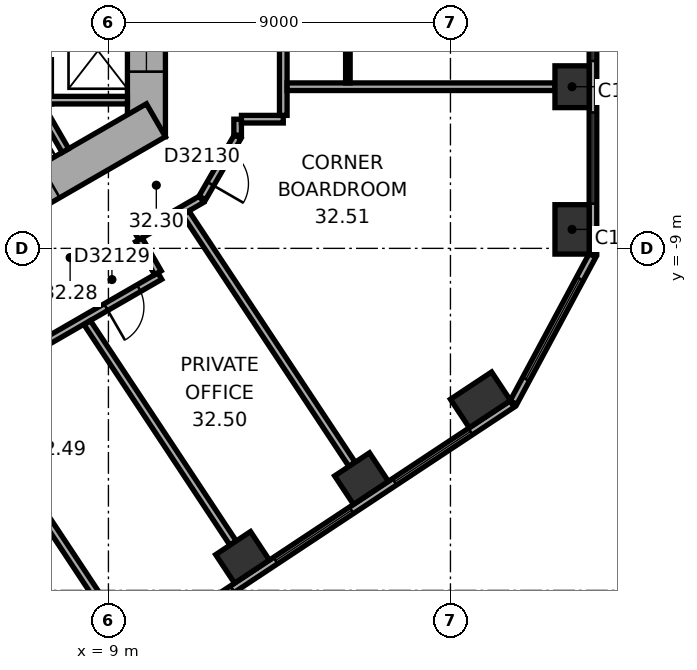
"""IFC4 building model, lengths in metres.
Left out: names, types, materials, properties, quantities, classifications, styles, units other than length and angle.
Written with IfcOpenShell. Run it as: python <this file> out.ifc"""

import sys

from ifc_helpers import new_model, si_unit, direction, frame, frame_2d, origin, origin_2d, place, context, subcontext, project, spatial, rectangle, extrude, element, fill, save


model = new_model("IFC4")
c1 = context("Model", 3, precision=1e-05, world=origin(), true_north=direction((0.0, 1.0)))
c2 = subcontext(c1, "Body", "Model", "MODEL_VIEW")
j1 = project(units=[si_unit("LENGTHUNIT", "METRE"), si_unit("PLANEANGLEUNIT", "RADIAN")], contexts=[c1])
p1 = place(None, origin())
s1 = spatial("IfcSite", under=j1, at=p1, CompositionType="ELEMENT")
p2 = place(p1, origin())
s2 = spatial("IfcBuilding", under=s1, at=p2, CompositionType="ELEMENT")
p3 = place(p2, frame((0.0, 0.0, 131.8)))
s3 = spatial("IfcBuildingStorey", under=s2, at=p3, CompositionType="ELEMENT", Elevation=131.8)
p4 = place(p3, frame((21.2, -8.501, 0.0), z_axis=(0.0, 0.0, 1.0), x_axis=(0.0, 1.0, 0.0)))
e1 = element("IfcColumn", 1, at=p4, inside=s3, PredefinedType="COLUMN", context=c2, shape_type="SweptSolid", body=[
    extrude(rectangle(XDim=1.3, YDim=0.9, at=origin_2d()), origin(), (0.0, 0.0, 1.0), 3.7),
])
for number, where, z_axis, x_axis in (
    (2, (21.2, -4.747, 0.0), (0.0, 0.0, 1.0), (0.0, 1.0, 0.0)),
    (3, (12.529, -17.13, 0.0), (0.0, 0.0, 1.0), (0.834, 0.552, 0.0)),
    (4, (15.659, -15.058, 0.0), (0.0, 0.0, 1.0), (0.834, 0.552, 0.0)),
):
    element("IfcColumn", number, at=place(p3, frame(where, z_axis=z_axis, x_axis=x_axis)), inside=s3, PredefinedType="COLUMN", context=c2, shape_type="SweptSolid", body=[
        extrude(rectangle(XDim=1.1, YDim=0.9, at=origin_2d()), origin(), (0.0, 0.0, 1.0), 3.7),
    ])
p5 = place(p3, frame((18.79, -12.986, 0.0), z_axis=(0.0, 0.0, 1.0), x_axis=(0.833885822067, 0.551936985312, 0.0)))
e5 = element("IfcColumn", 5, at=p5, inside=s3, PredefinedType="COLUMN", context=c2, shape_type="SweptSolid", body=[
    extrude(rectangle(XDim=1.3, YDim=0.9, at=origin_2d()), origin(), (0.0, 0.0, 1.0), 3.7),
])
p6 = place(p3, frame((10.0, -6.062, 0.0), z_axis=(0.0, 0.0, 1.0), x_axis=(0.0, 1.0, 0.0)))
e6 = element("IfcWall", 6, at=p6, inside=s3, PredefinedType="SHEAR", context=c2, shape_type="SweptSolid", body=[
    extrude(rectangle(XDim=12.125, YDim=1.0, at=frame_2d((6.062, 0.0))), origin(), (0.0, 0.0, 1.0), 3.7),
])
p7 = place(p6, frame((6.262, 0.0, 0.0)))
e7 = element("IfcOpeningElement", 7, at=p7, cuts=e6, PredefinedType="OPENING", context=c2, shape_type="SweptSolid", body=[
    extrude(rectangle(XDim=1.5, YDim=2.1, at=frame_2d((0.75, 1.05))), frame((0.0, 0.51, 0.0), z_axis=(0.0, -1.0, 0.0), x_axis=(1.0, 0.0, 0.0)), (0.0, 0.0, 1.0), 1.02),
])
p8 = place(p6, frame((1.712, 0.0, 0.0)))
e8 = element("IfcOpeningElement", 8, at=p8, cuts=e6, PredefinedType="OPENING", context=c2, shape_type="SweptSolid", body=[
    extrude(rectangle(XDim=1.1, YDim=2.1, at=frame_2d((0.55, 1.05))), frame((0.0, 0.51, 0.0), z_axis=(0.0, -1.0, 0.0), x_axis=(1.0, 0.0, 0.0)), (0.0, 0.0, 1.0), 1.02),
])
p9 = place(p6, frame((4.312, 0.0, 0.0)))
e9 = element("IfcOpeningElement", 9, at=p9, cuts=e6, PredefinedType="OPENING", context=c2, shape_type="SweptSolid", body=[
    extrude(rectangle(XDim=1.1, YDim=2.1, at=frame_2d((0.55, 1.05))), frame((0.0, 0.51, 0.0), z_axis=(0.0, -1.0, 0.0), x_axis=(1.0, 0.0, 0.0)), (0.0, 0.0, 1.0), 1.02),
])
p10 = place(p3, frame((-0.25, -11.691, 0.0), z_axis=(0.0, 0.0, 1.0), x_axis=(0.866022616891, 0.50000482701, 0.0)))
e10 = element("IfcWall", 10, at=p10, inside=s3, PredefinedType="SHEAR", context=c2, shape_type="SweptSolid", body=[
    extrude(rectangle(XDim=12.125, YDim=1.0, at=frame_2d((6.062, 0.0))), origin(), (0.0, 0.0, 1.0), 3.7),
])
p11 = place(p10, frame((4.012, 0.0, 0.0)))
e11 = element("IfcOpeningElement", 11, at=p11, cuts=e10, PredefinedType="OPENING", context=c2, shape_type="SweptSolid", body=[
    extrude(rectangle(XDim=0.9, YDim=2.1, at=frame_2d((0.45, 1.05))), frame((0.0, 0.51, 0.0), z_axis=(0.0, -1.0, 0.0), x_axis=(1.0, 0.0, 0.0)), (0.0, 0.0, 1.0), 1.02),
])
p12 = place(p10, frame((7.812, 0.0, 0.0)))
e12 = element("IfcOpeningElement", 12, at=p12, cuts=e10, PredefinedType="OPENING", context=c2, shape_type="SweptSolid", body=[
    extrude(rectangle(XDim=1.1, YDim=2.1, at=frame_2d((0.55, 1.05))), frame((0.0, 0.51, 0.0), z_axis=(0.0, -1.0, 0.0), x_axis=(1.0, 0.0, 0.0)), (0.0, 0.0, 1.0), 1.02),
])
p13 = place(p3, frame((21.75, -9.138, 0.0), z_axis=(0.0, 0.0, 1.0), x_axis=(0.0, 1.0, 0.0)))
e13 = element("IfcWall", 13, at=p13, inside=s3, PredefinedType="STANDARD", context=c2, shape_type="SweptSolid", body=[
    extrude(rectangle(XDim=20.044, YDim=0.2, at=frame_2d((10.022, 0.0))), origin(), (0.0, 0.0, 1.0), 3.7),
])
p14 = place(p13, frame((1.314, 0.0, 0.9)))
e14 = element("IfcOpeningElement", 14, at=p14, cuts=e13, PredefinedType="OPENING", context=c2, shape_type="SweptSolid", body=[
    extrude(rectangle(XDim=2.4, YDim=2.0, at=frame_2d((1.2, 1.0))), frame((0.0, 0.11, 0.0), z_axis=(0.0, -1.0, 0.0), x_axis=(1.0, 0.0, 0.0)), (0.0, 0.0, 1.0), 0.22),
])
p15 = place(p13, frame((5.069, 0.0, 0.9)))
e15 = element("IfcOpeningElement", 15, at=p15, cuts=e13, PredefinedType="OPENING", context=c2, shape_type="SweptSolid", body=[
    extrude(rectangle(XDim=2.4, YDim=2.0, at=frame_2d((1.2, 1.0))), frame((0.0, 0.11, 0.0), z_axis=(0.0, -1.0, 0.0), x_axis=(1.0, 0.0, 0.0)), (0.0, 0.0, 1.0), 0.22),
])
p16 = place(p13, frame((8.823, 0.0, 0.9)))
e16 = element("IfcOpeningElement", 16, at=p16, cuts=e13, PredefinedType="OPENING", context=c2, shape_type="SweptSolid", body=[
    extrude(rectangle(XDim=2.4, YDim=2.0, at=frame_2d((1.2, 1.0))), frame((0.0, 0.11, 0.0), z_axis=(0.0, -1.0, 0.0), x_axis=(1.0, 0.0, 0.0)), (0.0, 0.0, 1.0), 0.22),
])
p17 = place(p13, frame((12.577, 0.0, 0.9)))
e17 = element("IfcOpeningElement", 17, at=p17, cuts=e13, PredefinedType="OPENING", context=c2, shape_type="SweptSolid", body=[
    extrude(rectangle(XDim=2.4, YDim=2.0, at=frame_2d((1.2, 1.0))), frame((0.0, 0.11, 0.0), z_axis=(0.0, -1.0, 0.0), x_axis=(1.0, 0.0, 0.0)), (0.0, 0.0, 1.0), 0.22),
])
p18 = place(p13, frame((16.331, 0.0, 0.9)))
e18 = element("IfcOpeningElement", 18, at=p18, cuts=e13, PredefinedType="OPENING", context=c2, shape_type="SweptSolid", body=[
    extrude(rectangle(XDim=2.4, YDim=2.0, at=frame_2d((1.2, 1.0))), frame((0.0, 0.11, 0.0), z_axis=(0.0, -1.0, 0.0), x_axis=(1.0, 0.0, 0.0)), (0.0, 0.0, 1.0), 0.22),
])
p19 = place(p3, frame((2.911, -24.156, 0.0), z_axis=(0.0, 0.0, 1.0), x_axis=(0.833882163564, 0.551942512668, 0.0)))
e19 = element("IfcWall", 19, at=p19, inside=s3, PredefinedType="STANDARD", context=c2, shape_type="SweptSolid", body=[
    extrude(rectangle(XDim=20.044, YDim=0.2, at=frame_2d((10.022, 0.0))), origin(), (0.0, 0.0, 1.0), 3.7),
])
p20 = place(p19, frame((1.313, 0.0, 0.9)))
e20 = element("IfcOpeningElement", 20, at=p20, cuts=e19, PredefinedType="OPENING", context=c2, shape_type="SweptSolid", body=[
    extrude(rectangle(XDim=2.4, YDim=2.0, at=frame_2d((1.2, 1.0))), frame((0.0, 0.11, 0.0), z_axis=(0.0, -1.0, 0.0), x_axis=(1.0, 0.0, 0.0)), (0.0, 0.0, 1.0), 0.22),
])
p21 = place(p19, frame((5.067, 0.0, 0.9)))
e21 = element("IfcOpeningElement", 21, at=p21, cuts=e19, PredefinedType="OPENING", context=c2, shape_type="SweptSolid", body=[
    extrude(rectangle(XDim=2.4, YDim=2.0, at=frame_2d((1.2, 1.0))), frame((0.0, 0.11, 0.0), z_axis=(0.0, -1.0, 0.0), x_axis=(1.0, 0.0, 0.0)), (0.0, 0.0, 1.0), 0.22),
])
p22 = place(p19, frame((8.821, 0.0, 0.9)))
e22 = element("IfcOpeningElement", 22, at=p22, cuts=e19, PredefinedType="OPENING", context=c2, shape_type="SweptSolid", body=[
    extrude(rectangle(XDim=2.4, YDim=2.0, at=frame_2d((1.2, 1.0))), frame((0.0, 0.11, 0.0), z_axis=(0.0, -1.0, 0.0), x_axis=(1.0, 0.0, 0.0)), (0.0, 0.0, 1.0), 0.22),
])
p23 = place(p19, frame((12.575, 0.0, 0.9)))
e23 = element("IfcOpeningElement", 23, at=p23, cuts=e19, PredefinedType="OPENING", context=c2, shape_type="SweptSolid", body=[
    extrude(rectangle(XDim=2.4, YDim=2.0, at=frame_2d((1.2, 1.0))), frame((0.0, 0.11, 0.0), z_axis=(0.0, -1.0, 0.0), x_axis=(1.0, 0.0, 0.0)), (0.0, 0.0, 1.0), 0.22),
])
p24 = place(p19, frame((16.329, 0.0, 0.9)))
e24 = element("IfcOpeningElement", 24, at=p24, cuts=e19, PredefinedType="OPENING", context=c2, shape_type="SweptSolid", body=[
    extrude(rectangle(XDim=2.4, YDim=2.0, at=frame_2d((1.2, 1.0))), frame((0.0, 0.11, 0.0), z_axis=(0.0, -1.0, 0.0), x_axis=(1.0, 0.0, 0.0)), (0.0, 0.0, 1.0), 0.22),
])
p25 = place(p3, frame((19.658, -13.057, 0.0), z_axis=(0.0, 0.0, 1.0), x_axis=(0.473307879841, 0.880897071672, 0.0)))
e25 = element("IfcWall", 25, at=p25, inside=s3, PredefinedType="STANDARD", context=c2, shape_type="SweptSolid", body=[
    extrude(rectangle(XDim=4.395, YDim=0.2, at=frame_2d((2.197, 0.0))), origin(), (0.0, 0.0, 1.0), 3.7),
])
p26 = place(p25, frame((0.698, 0.0, 0.9)))
e26 = element("IfcOpeningElement", 26, at=p26, cuts=e25, PredefinedType="OPENING", context=c2, shape_type="SweptSolid", body=[
    extrude(rectangle(XDim=3.0, YDim=2.0, at=frame_2d((1.5, 1.0))), frame((0.0, 0.11, 0.0), z_axis=(0.0, -1.0, 0.0), x_axis=(1.0, 0.0, 0.0)), (0.0, 0.0, 1.0), 0.22),
])
for number, where, z_axis, x_axis in (
    (27, (7.3, -5.1, 0.0), (0.0, 0.0, 1.0), (1.0, 0.0, 0.0)),
    (28, (6.768, -4.522, 0.0), (0.0, 0.0, 1.0), (0.5, -0.866, 0.0)),
):
    element("IfcWall", number, at=place(p3, frame(where, z_axis=z_axis, x_axis=x_axis)), inside=s3, PredefinedType="PARTITIONING", context=c2, shape_type="SweptSolid", body=[
        extrude(rectangle(XDim=2.2, YDim=0.2, at=frame_2d((1.1, 0.0))), origin(), (0.0, 0.0, 1.0), 3.42),
    ])
p27 = place(p3, frame((7.319, -11.479, 0.0), z_axis=(0.0, 0.0, 1.0), x_axis=(0.866038154057, 0.49997791523, 0.0)))
e29 = element("IfcWall", 29, at=p27, inside=s3, PredefinedType="PARTITIONING", context=c2, shape_type="SweptSolid", body=[
    extrude(rectangle(XDim=3.502, YDim=0.2, at=frame_2d((1.751, 0.0))), origin(), (0.0, 0.0, 1.0), 3.42),
])
p28 = place(p27, frame((1.865, 0.0, 0.0)))
e30 = element("IfcOpeningElement", 30, at=p28, cuts=e29, PredefinedType="OPENING", context=c2, shape_type="SweptSolid", body=[
    extrude(rectangle(XDim=1.0, YDim=2.1, at=frame_2d((0.5, 1.05))), frame((0.0, 0.11, 0.0), z_axis=(0.0, -1.0, 0.0), x_axis=(1.0, 0.0, 0.0)), (0.0, 0.0, 1.0), 0.22),
])
p29 = place(p3, frame((9.15, -18.827, 0.0), z_axis=(0.0, 0.0, 1.0), x_axis=(-0.551942527453, 0.833882153777, 0.0)))
e31 = element("IfcWall", 31, at=p29, inside=s3, PredefinedType="PARTITIONING", context=c2, shape_type="SweptSolid", body=[
    extrude(rectangle(XDim=8.386, YDim=0.2, at=frame_2d((4.193, 0.0))), origin(), (0.0, 0.0, 1.0), 2.87),
])
p30 = place(p3, frame((9.752, -8.688, 0.0), z_axis=(0.0, 0.0, 1.0), x_axis=(0.865974105138, 0.500088841337, 0.0)))
e32 = element("IfcWall", 32, at=p30, inside=s3, PredefinedType="PARTITIONING", context=c2, shape_type="SweptSolid", body=[
    extrude(rectangle(XDim=1.961, YDim=0.2, at=frame_2d((0.98, 0.0))), origin(), (0.0, 0.0, 1.0), 3.42),
])
p31 = place(p3, frame((10.302, -9.642, 0.0), z_axis=(0.0, 0.0, 1.0), x_axis=(-0.500074377092, 0.865982457891, 0.0)))
e33 = element("IfcWall", 33, at=p31, inside=s3, PredefinedType="PARTITIONING", context=c2, shape_type="SweptSolid", body=[
    extrude(rectangle(XDim=1.001, YDim=0.2, at=frame_2d((0.5, 0.0))), origin(), (0.0, 0.0, 1.0), 3.42),
])
p32 = place(p3, frame((11.47, -7.673, 0.0), z_axis=(0.0, 0.0, 1.0), x_axis=(0.499964847546, 0.866045698112, 0.0)))
e34 = element("IfcWall", 34, at=p32, inside=s3, PredefinedType="PARTITIONING", context=c2, shape_type="SweptSolid", body=[
    extrude(rectangle(XDim=1.86, YDim=0.2, at=frame_2d((0.93, 0.0))), origin(), (0.0, 0.0, 1.0), 3.42),
])
p33 = place(p32, frame((0.43, 0.0, 0.0)))
e35 = element("IfcOpeningElement", 35, at=p33, cuts=e34, PredefinedType="OPENING", context=c2, shape_type="SweptSolid", body=[
    extrude(rectangle(XDim=1.0, YDim=2.1, at=frame_2d((0.5, 1.05))), frame((0.0, 0.11, 0.0), z_axis=(0.0, -1.0, 0.0), x_axis=(1.0, 0.0, 0.0)), (0.0, 0.0, 1.0), 0.22),
])
p34 = place(p3, frame((12.281, -16.755, 0.0), z_axis=(0.0, 0.0, 1.0), x_axis=(-0.551925794663, 0.833893228888, 0.0)))
e36 = element("IfcWall", 36, at=p34, inside=s3, PredefinedType="PARTITIONING", context=c2, shape_type="SweptSolid", body=[
    extrude(rectangle(XDim=6.953, YDim=0.2, at=frame_2d((3.476, 0.0))), origin(), (0.0, 0.0, 1.0), 3.42),
])
p35 = place(p3, frame((12.4, -6.022, 0.0), z_axis=(0.0, 0.0, 1.0), x_axis=(0.0, 1.0, 0.0)))
e37 = element("IfcWall", 37, at=p35, inside=s3, PredefinedType="PARTITIONING", context=c2, shape_type="SweptSolid", body=[
    extrude(rectangle(XDim=0.421, YDim=0.2, at=frame_2d((0.21, 0.0))), origin(), (0.0, 0.0, 1.0), 3.42),
])
p36 = place(p3, frame((12.5, -5.601, 0.0), z_axis=(0.0, 0.0, 1.0), x_axis=(1.0, 0.0, 0.0)))
e38 = element("IfcWall", 38, at=p36, inside=s3, PredefinedType="PARTITIONING", context=c2, shape_type="SweptSolid", body=[
    extrude(rectangle(XDim=1.101, YDim=0.2, at=frame_2d((0.551, 0.0))), origin(), (0.0, 0.0, 1.0), 3.42),
])
p37 = place(p3, frame((13.601, -5.501, 0.0), z_axis=(0.0, 0.0, 1.0), x_axis=(0.0, 1.0, 0.0)))
e39 = element("IfcWall", 39, at=p37, inside=s3, PredefinedType="PARTITIONING", context=c2, shape_type="SweptSolid", body=[
    extrude(rectangle(XDim=5.702, YDim=0.2, at=frame_2d((2.851, 0.0))), origin(), (0.0, 0.0, 1.0), 3.42),
])
p38 = place(p37, frame((2.728, 0.0, 0.0)))
e40 = element("IfcOpeningElement", 40, at=p38, cuts=e39, PredefinedType="OPENING", context=c2, shape_type="SweptSolid", body=[
    extrude(rectangle(XDim=1.0, YDim=2.1, at=frame_2d((0.5, 1.05))), frame((0.0, 0.11, 0.0), z_axis=(0.0, -1.0, 0.0), x_axis=(1.0, 0.0, 0.0)), (0.0, 0.0, 1.0), 0.22),
])
p39 = place(p3, frame((13.701, -4.747, 0.0), z_axis=(0.0, 0.0, 1.0), x_axis=(1.0, 0.0, 0.0)))
e41 = element("IfcWall", 41, at=p39, inside=s3, PredefinedType="PARTITIONING", context=c2, shape_type="SweptSolid", body=[
    extrude(rectangle(XDim=7.049, YDim=0.2, at=frame_2d((3.524, 0.0))), origin(), (0.0, 0.0, 1.0), 3.42),
])
p40 = place(p3, frame((15.301, -4.647, 0.0), z_axis=(0.0, 0.0, 1.0), x_axis=(0.0, 1.0, 0.0)))
e42 = element("IfcWall", 42, at=p40, inside=s3, PredefinedType="PARTITIONING", context=c2, shape_type="SweptSolid", body=[
    extrude(rectangle(XDim=7.308, YDim=0.12, at=frame_2d((3.654, 0.0))), origin(), (0.0, 0.0, 1.0), 3.42),
])
p41 = place(p40, frame((5.808, 0.0, 0.0)))
e43 = element("IfcOpeningElement", 43, at=p41, cuts=e42, PredefinedType="OPENING", context=c2, shape_type="SweptSolid", body=[
    extrude(rectangle(XDim=1.0, YDim=2.1, at=frame_2d((0.5, 1.05))), frame((0.0, 0.07, 0.0), z_axis=(0.0, -1.0, 0.0), x_axis=(1.0, 0.0, 0.0)), (0.0, 0.0, 1.0), 0.14),
])
p42 = place(p40, frame((1.15, 0.0, 0.0)))
e44 = element("IfcOpeningElement", 44, at=p42, cuts=e42, PredefinedType="OPENING", context=c2, shape_type="SweptSolid", body=[
    extrude(rectangle(XDim=0.9, YDim=2.1, at=frame_2d((0.45, 1.05))), frame((0.0, 0.07, 0.0), z_axis=(0.0, -1.0, 0.0), x_axis=(1.0, 0.0, 0.0)), (0.0, 0.0, 1.0), 0.14),
])
p43 = place(p40, frame((3.804, 0.0, 0.0)))
e45 = element("IfcOpeningElement", 45, at=p43, cuts=e42, PredefinedType="OPENING", context=c2, shape_type="SweptSolid", body=[
    extrude(rectangle(XDim=0.9, YDim=2.1, at=frame_2d((0.45, 1.05))), frame((0.0, 0.07, 0.0), z_axis=(0.0, -1.0, 0.0), x_axis=(1.0, 0.0, 0.0)), (0.0, 0.0, 1.0), 0.14),
])
p44 = place(p3, frame((15.411, -14.683, 0.0), z_axis=(0.0, 0.0, 1.0), x_axis=(-0.551932106251, 0.833889051427, 0.0)))
e46 = element("IfcWall", 46, at=p44, inside=s3, PredefinedType="PARTITIONING", context=c2, shape_type="SweptSolid", body=[
    extrude(rectangle(XDim=7.926, YDim=0.2, at=frame_2d((3.963, 0.0))), origin(), (0.0, 0.0, 1.0), 2.87),
])
p45 = place(p14, origin())
e47 = element("IfcWindow", 47, at=p45, inside=s3, PartitioningType="SINGLE_PANEL", PredefinedType="WINDOW", context=c2, shape_type="SweptSolid", body=[
    extrude(rectangle(XDim=2.4, YDim=2.0, at=frame_2d((1.2, 1.0))), frame((0.0, 0.03, 0.0), z_axis=(0.0, -1.0, 0.0), x_axis=(1.0, 0.0, 0.0)), (0.0, 0.0, 1.0), 0.06),
])
fill(e14, e47)
p46 = place(p15, origin())
e48 = element("IfcWindow", 48, at=p46, inside=s3, PartitioningType="SINGLE_PANEL", PredefinedType="WINDOW", context=c2, shape_type="SweptSolid", body=[
    extrude(rectangle(XDim=2.4, YDim=2.0, at=frame_2d((1.2, 1.0))), frame((0.0, 0.03, 0.0), z_axis=(0.0, -1.0, 0.0), x_axis=(1.0, 0.0, 0.0)), (0.0, 0.0, 1.0), 0.06),
])
fill(e15, e48)
p47 = place(p22, origin())
e49 = element("IfcWindow", 49, at=p47, inside=s3, PartitioningType="SINGLE_PANEL", PredefinedType="WINDOW", context=c2, shape_type="SweptSolid", body=[
    extrude(rectangle(XDim=2.4, YDim=2.0, at=frame_2d((1.2, 1.0))), frame((0.0, 0.03, 0.0), z_axis=(0.0, -1.0, 0.0), x_axis=(1.0, 0.0, 0.0)), (0.0, 0.0, 1.0), 0.06),
])
fill(e22, e49)
p48 = place(p23, origin())
e50 = element("IfcWindow", 50, at=p48, inside=s3, PartitioningType="SINGLE_PANEL", PredefinedType="WINDOW", context=c2, shape_type="SweptSolid", body=[
    extrude(rectangle(XDim=2.4, YDim=2.0, at=frame_2d((1.2, 1.0))), frame((0.0, 0.03, 0.0), z_axis=(0.0, -1.0, 0.0), x_axis=(1.0, 0.0, 0.0)), (0.0, 0.0, 1.0), 0.06),
])
fill(e23, e50)
p49 = place(p24, origin())
e51 = element("IfcWindow", 51, at=p49, inside=s3, PartitioningType="SINGLE_PANEL", PredefinedType="WINDOW", context=c2, shape_type="SweptSolid", body=[
    extrude(rectangle(XDim=2.4, YDim=2.0, at=frame_2d((1.2, 1.0))), frame((0.0, 0.03, 0.0), z_axis=(0.0, -1.0, 0.0), x_axis=(1.0, 0.0, 0.0)), (0.0, 0.0, 1.0), 0.06),
])
fill(e24, e51)
p50 = place(p26, origin())
e52 = element("IfcWindow", 52, at=p50, inside=s3, PartitioningType="SINGLE_PANEL", PredefinedType="WINDOW", context=c2, shape_type="SweptSolid", body=[
    extrude(rectangle(XDim=3.0, YDim=2.0, at=frame_2d((1.5, 1.0))), frame((0.0, 0.03, 0.0), z_axis=(0.0, -1.0, 0.0), x_axis=(1.0, 0.0, 0.0)), (0.0, 0.0, 1.0), 0.06),
])
fill(e26, e52)
p51 = place(p8, origin())
e53 = element("IfcDoor", 53, at=p51, inside=s3, OperationType="DOUBLE_DOOR_SLIDING", PredefinedType="DOOR", context=c2, shape_type="SweptSolid", body=[
    extrude(rectangle(XDim=1.1, YDim=2.1, at=frame_2d((0.55, 1.05))), frame((0.0, 0.025, 0.0), z_axis=(0.0, -1.0, 0.0), x_axis=(1.0, 0.0, 0.0)), (0.0, 0.0, 1.0), 0.05),
])
fill(e8, e53)
p52 = place(p28, origin())
e54 = element("IfcDoor", 54, at=p52, inside=s3, OperationType="SINGLE_SWING_LEFT", PredefinedType="DOOR", context=c2, shape_type="SweptSolid", body=[
    extrude(rectangle(XDim=1.0, YDim=2.1, at=frame_2d((0.5, 1.05))), frame((0.0, 0.025, 0.0), z_axis=(0.0, -1.0, 0.0), x_axis=(1.0, 0.0, 0.0)), (0.0, 0.0, 1.0), 0.05),
])
fill(e30, e54)
p53 = place(p33, origin())
e55 = element("IfcDoor", 55, at=p53, inside=s3, OperationType="SINGLE_SWING_LEFT", PredefinedType="DOOR", context=c2, shape_type="SweptSolid", body=[
    extrude(rectangle(XDim=1.0, YDim=2.1, at=frame_2d((0.5, 1.05))), frame((0.0, 0.025, 0.0), z_axis=(0.0, -1.0, 0.0), x_axis=(1.0, 0.0, 0.0)), (0.0, 0.0, 1.0), 0.05),
])
fill(e35, e55)
save(model, sys.argv[1])
